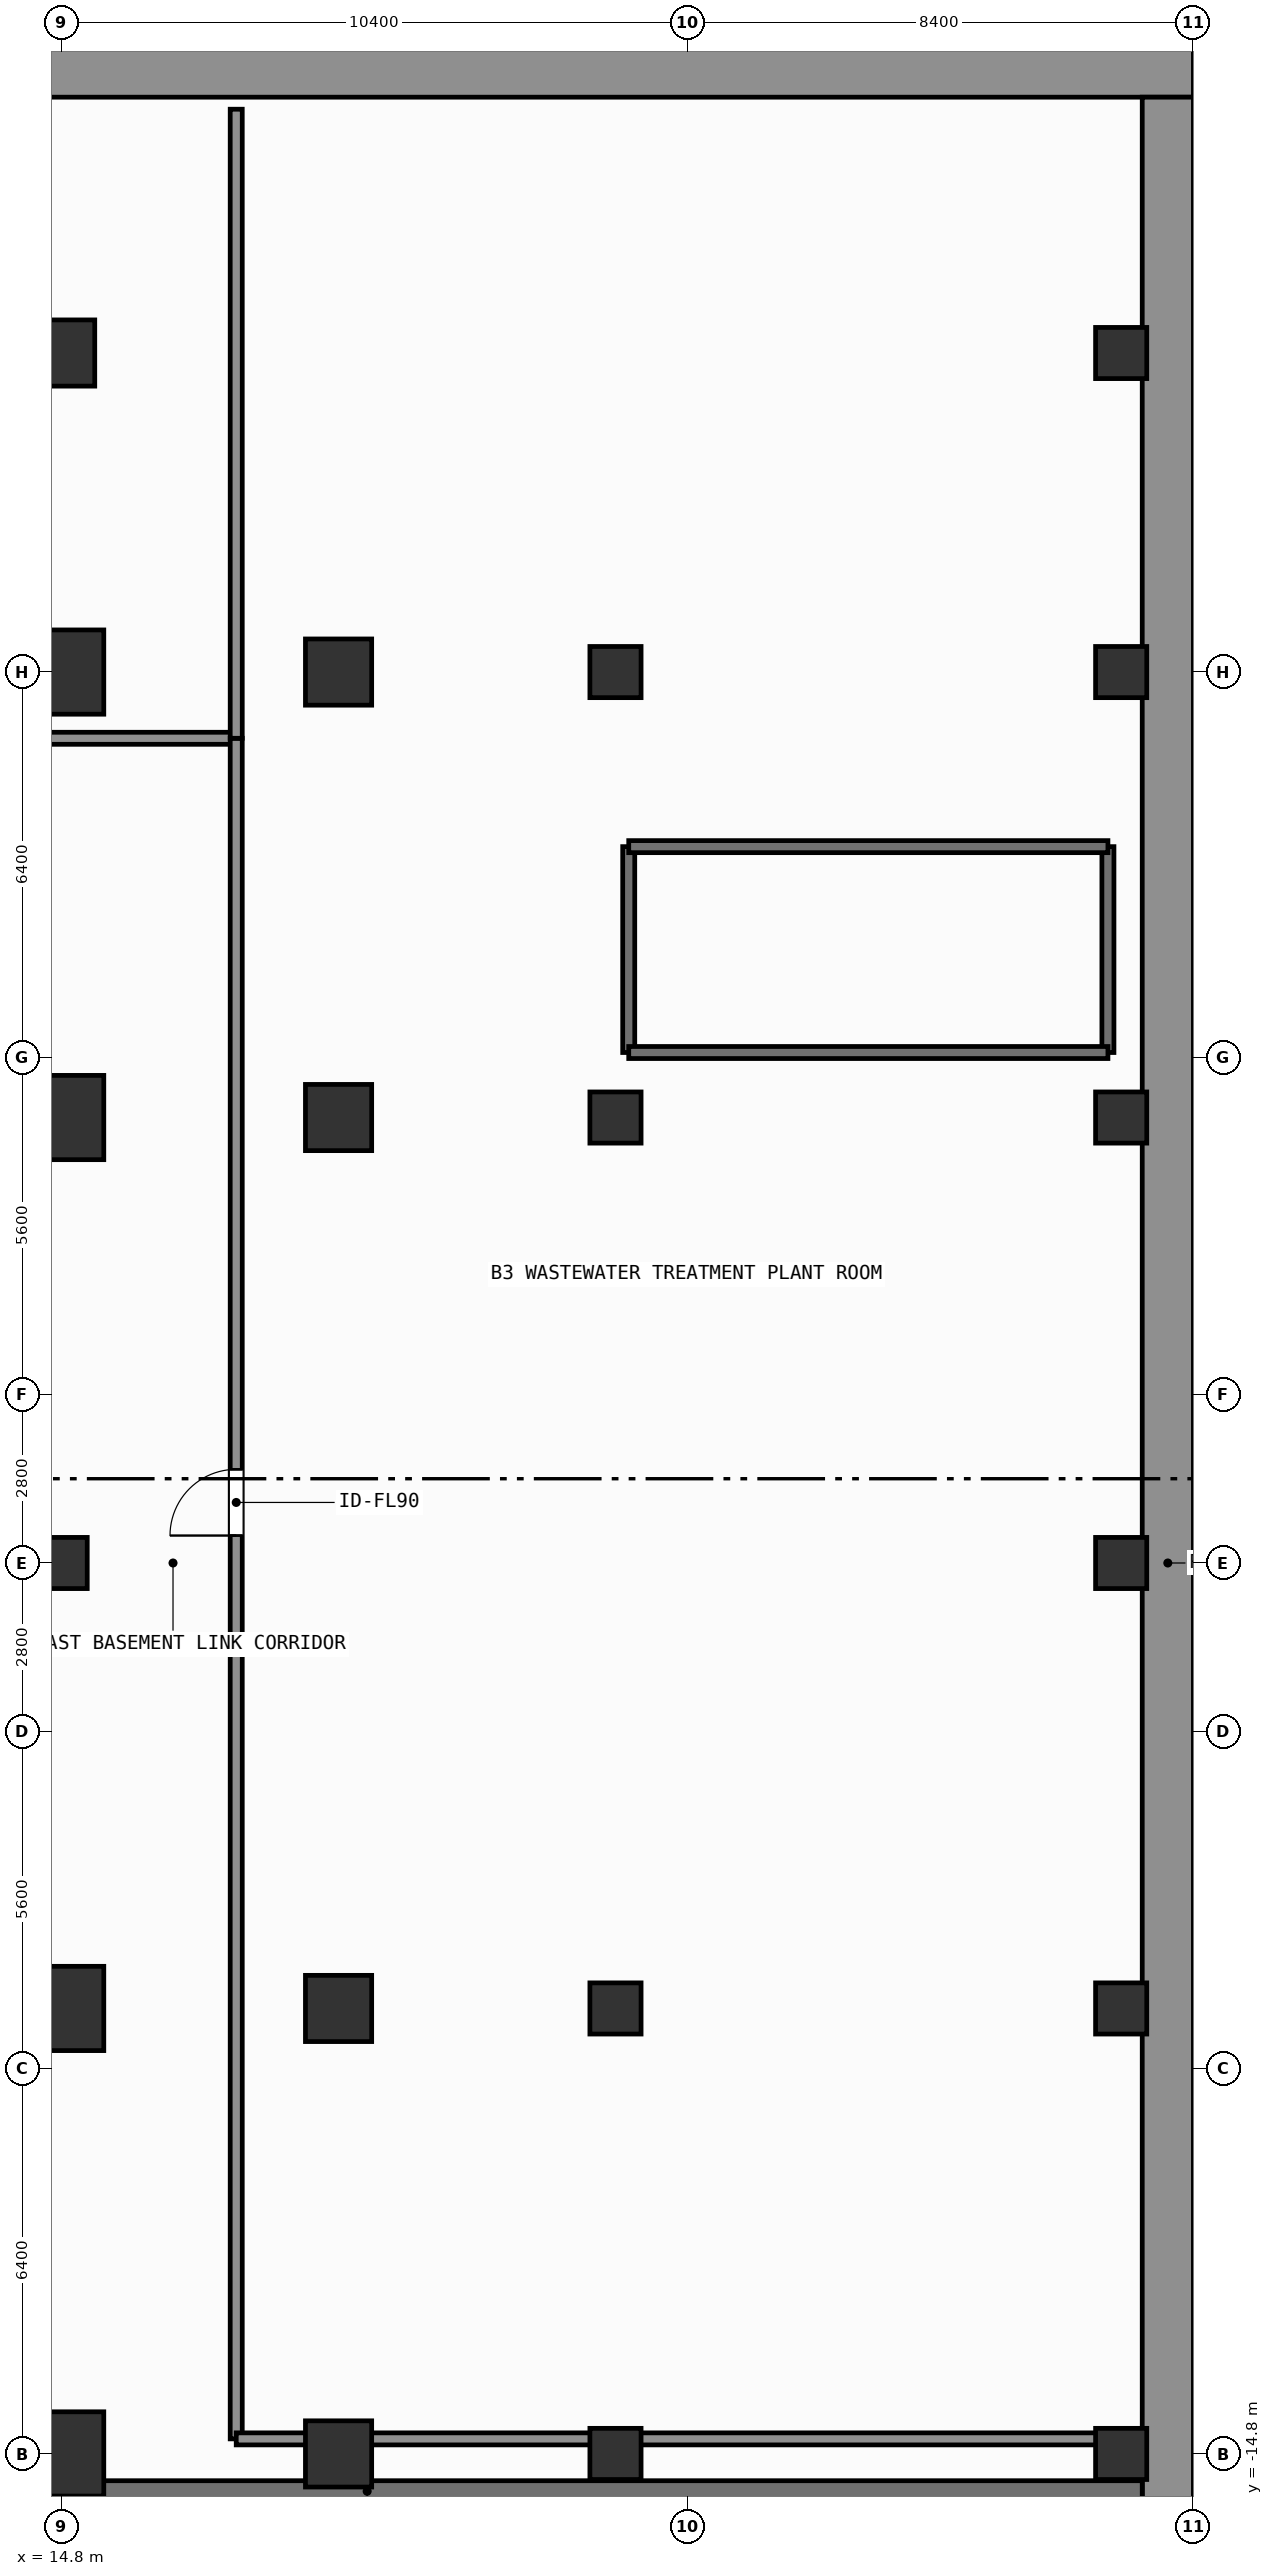
"""IFC4 building model, lengths in metres.
Left out: names, types, materials, properties, quantities, classifications, styles, units other than length and angle.
Written with IfcOpenShell. Run it as: python <this file> out.ifc"""

import sys

from ifc_helpers import new_model, si_unit, direction, frame, frame_2d, origin, origin_2d, place, context, subcontext, project, spatial, rectangle, extrude, element, fill, save


model = new_model("IFC4")
c1 = context("Model", 3, precision=1e-05, world=origin(), true_north=direction((0.0, 1.0)))
c2 = subcontext(c1, "Body", "Model", "MODEL_VIEW")
j1 = project(units=[si_unit("LENGTHUNIT", "METRE"), si_unit("PLANEANGLEUNIT", "RADIAN")], contexts=[c1])
p1 = place(None, origin())
s1 = spatial("IfcSite", under=j1, at=p1, CompositionType="ELEMENT")
p2 = place(p1, origin())
s2 = spatial("IfcBuilding", under=s1, at=p2, CompositionType="ELEMENT")
p3 = place(p2, frame((0.0, 0.0, -12.6)))
s3 = spatial("IfcBuildingStorey", under=s2, at=p3, CompositionType="ELEMENT", Elevation=-12.6)
p4 = place(p3, frame((-33.6, 24.775, 0.0), z_axis=(0.0, 0.0, 1.0), x_axis=(1.0, 0.0, 0.0)))
e1 = element("IfcWall", 1, at=p4, inside=s3, PredefinedType="SOLIDWALL", context=c2, shape_type="SweptSolid", body=[
    extrude(rectangle(XDim=67.2, YDim=0.85, at=frame_2d((33.6, 0.0))), origin(), (0.0, 0.0, 1.0), 4.2),
])
p5 = place(p3, frame((33.175, -24.35, 0.0), z_axis=(0.0, 0.0, 1.0), x_axis=(0.0, 1.0, 0.0)))
e2 = element("IfcWall", 2, at=p5, inside=s3, PredefinedType="SOLIDWALL", context=c2, shape_type="SweptSolid", body=[
    extrude(rectangle(XDim=48.7, YDim=0.85, at=frame_2d((24.35, 0.0))), origin(), (0.0, 0.0, 1.0), 4.2),
])
p6 = place(p3, frame((7.0, -15.42, 0.0), z_axis=(0.0, 0.0, 1.0), x_axis=(1.0, 0.0, 0.0)))
e3 = element("IfcWall", 3, at=p6, inside=s3, PredefinedType="SHEAR", context=c2, shape_type="SweptSolid", body=[
    extrude(rectangle(XDim=25.75, YDim=0.35, at=frame_2d((12.875, 0.0))), origin(), (0.0, 0.0, 1.0), 4.2),
])
for number, where, z_axis, x_axis in (
    (4, (14.8, -14.8, 0.0), (0.0, 0.0, 1.0), (1.0, 0.0, 0.0)),
    (5, (14.8, 14.8, 0.0), (0.0, 0.0, 1.0), (1.0, 0.0, 0.0)),
    (6, (14.8, -7.4, 0.0), (0.0, 0.0, 1.0), (1.0, 0.0, 0.0)),
    (7, (14.8, 7.4, 0.0), (0.0, 0.0, 1.0), (1.0, 0.0, 0.0)),
):
    element("IfcColumn", number, at=place(p3, frame(where, z_axis=z_axis, x_axis=x_axis)), inside=s3, PredefinedType="COLUMN", context=c2, shape_type="SweptSolid", body=[
        extrude(rectangle(XDim=1.4, YDim=1.4, at=origin_2d()), origin(), (0.0, 0.0, 1.0), 4.2),
    ])
for number, where, z_axis, x_axis in (
    (8, (19.4, -14.8, 0.0), (0.0, 0.0, 1.0), (1.0, 0.0, 0.0)),
    (9, (19.4, -7.4, 0.0), (0.0, 0.0, 1.0), (1.0, 0.0, 0.0)),
    (10, (19.4, 7.4, 0.0), (0.0, 0.0, 1.0), (1.0, 0.0, 0.0)),
    (11, (19.4, 14.8, 0.0), (0.0, 0.0, 1.0), (1.0, 0.0, 0.0)),
    (12, (14.8, 20.1, 0.0), (0.0, 0.0, 1.0), (1.0, 0.0, 0.0)),
):
    element("IfcColumn", number, at=place(p3, frame(where, z_axis=z_axis, x_axis=x_axis)), inside=s3, PredefinedType="COLUMN", context=c2, shape_type="SweptSolid", body=[
        extrude(rectangle(XDim=1.1, YDim=1.1, at=origin_2d()), origin(), (0.0, 0.0, 1.0), 4.2),
    ])
for number, where, z_axis, x_axis in (
    (13, (14.8, 0.0, 0.0), (0.0, 0.0, 1.0), (1.0, 0.0, 0.0)),
    (14, (24.0, -14.8, 0.0), (0.0, 0.0, 1.0), (1.0, 0.0, 0.0)),
    (15, (24.0, -7.4, 0.0), (0.0, 0.0, 1.0), (1.0, 0.0, 0.0)),
    (16, (24.0, 7.4, 0.0), (0.0, 0.0, 1.0), (1.0, 0.0, 0.0)),
    (17, (24.0, 14.8, 0.0), (0.0, 0.0, 1.0), (1.0, 0.0, 0.0)),
    (18, (32.4, -14.8, 0.0), (0.0, 0.0, 1.0), (1.0, 0.0, 0.0)),
    (19, (32.4, -7.4, 0.0), (0.0, 0.0, 1.0), (1.0, 0.0, 0.0)),
    (20, (32.4, 0.0, 0.0), (0.0, 0.0, 1.0), (1.0, 0.0, 0.0)),
    (21, (32.4, 7.4, 0.0), (0.0, 0.0, 1.0), (1.0, 0.0, 0.0)),
    (22, (32.4, 14.8, 0.0), (0.0, 0.0, 1.0), (1.0, 0.0, 0.0)),
    (23, (32.4, 20.1, 0.0), (0.0, 0.0, 1.0), (1.0, 0.0, 0.0)),
):
    element("IfcColumn", number, at=place(p3, frame(where, z_axis=z_axis, x_axis=x_axis)), inside=s3, PredefinedType="COLUMN", context=c2, shape_type="SweptSolid", body=[
        extrude(rectangle(XDim=0.85, YDim=0.85, at=origin_2d()), origin(), (0.0, 0.0, 1.0), 4.2),
    ])
for number, where, z_axis, x_axis in (
    (24, (24.22, 8.48, 0.0), (0.0, 0.0, 1.0), (0.0, 1.0, 0.0)),
    (25, (32.18, 11.9, 0.0), (0.0, 0.0, 1.0), (0.0, -1.0, 0.0)),
):
    element("IfcWall", number, at=place(p3, frame(where, z_axis=z_axis, x_axis=x_axis)), inside=s3, PredefinedType="SHEAR", context=c2, shape_type="SweptSolid", body=[
        extrude(rectangle(XDim=3.42, YDim=0.2, at=frame_2d((1.71, 0.0))), origin(), (0.0, 0.0, 1.0), 3.94),
    ])
for number, where, z_axis, x_axis in (
    (26, (32.18, 8.48, 0.0), (0.0, 0.0, 1.0), (-1.0, 0.0, 0.0)),
    (27, (24.22, 11.9, 0.0), (0.0, 0.0, 1.0), (1.0, 0.0, 0.0)),
):
    element("IfcWall", number, at=place(p3, frame(where, z_axis=z_axis, x_axis=x_axis)), inside=s3, PredefinedType="SHEAR", context=c2, shape_type="SweptSolid", body=[
        extrude(rectangle(XDim=7.96, YDim=0.2, at=frame_2d((3.98, 0.0))), origin(), (0.0, 0.0, 1.0), 3.94),
    ])
p7 = place(p3, frame((-13.6, 13.7, 0.0), z_axis=(0.0, 0.0, 1.0), x_axis=(1.0, 0.0, 0.0)))
e28 = element("IfcWall", 28, at=p7, inside=s3, PredefinedType="SOLIDWALL", context=c2, shape_type="SweptSolid", body=[
    extrude(rectangle(XDim=31.3, YDim=0.2, at=frame_2d((15.65, 0.0))), origin(), (0.0, 0.0, 1.0), 3.94),
])
p8 = place(p7, frame((14.38, 0.0, 0.0)))
e29 = element("IfcOpeningElement", 29, at=p8, cuts=e28, PredefinedType="OPENING", context=c2, shape_type="SweptSolid", body=[
    extrude(rectangle(XDim=1.1, YDim=2.15, at=frame_2d((0.55, 1.075))), frame((0.0, 0.11, 0.0), z_axis=(0.0, -1.0, 0.0), x_axis=(1.0, 0.0, 0.0)), (0.0, 0.0, 1.0), 0.22),
])
p9 = place(p3, frame((17.7, -14.55, 0.0), z_axis=(0.0, 0.0, 1.0), x_axis=(0.0, 1.0, 0.0)))
e30 = element("IfcWall", 30, at=p9, inside=s3, PredefinedType="SOLIDWALL", context=c2, shape_type="SweptSolid", body=[
    extrude(rectangle(XDim=28.25, YDim=0.2, at=frame_2d((14.125, 0.0))), origin(), (0.0, 0.0, 1.0), 3.94),
])
p10 = place(p9, frame((15.006, 0.0, 0.0)))
e31 = element("IfcOpeningElement", 31, at=p10, cuts=e30, PredefinedType="OPENING", context=c2, shape_type="SweptSolid", body=[
    extrude(rectangle(XDim=1.1, YDim=2.15, at=frame_2d((0.55, 1.075))), frame((0.0, 0.11, 0.0), z_axis=(0.0, -1.0, 0.0), x_axis=(1.0, 0.0, 0.0)), (0.0, 0.0, 1.0), 0.22),
])
p11 = place(p3, frame((17.7, 13.7, 0.0), z_axis=(0.0, 0.0, 1.0), x_axis=(0.0, 1.0, 0.0)))
e32 = element("IfcWall", 32, at=p11, inside=s3, PredefinedType="SOLIDWALL", context=c2, shape_type="SweptSolid", body=[
    extrude(rectangle(XDim=10.45, YDim=0.2, at=frame_2d((5.225, 0.0))), origin(), (0.0, 0.0, 1.0), 3.94),
])
p12 = place(p3, frame((17.7, -14.55, 0.0), z_axis=(0.0, 0.0, 1.0), x_axis=(1.0, 0.0, 0.0)))
e33 = element("IfcWall", 33, at=p12, inside=s3, PredefinedType="SOLIDWALL", context=c2, shape_type="SweptSolid", body=[
    extrude(rectangle(XDim=14.95, YDim=0.2, at=frame_2d((7.475, 0.0))), origin(), (0.0, 0.0, 1.0), 3.23),
])
p13 = place(p10, origin())
e34 = element("IfcDoor", 34, at=p13, inside=s3, OperationType="SINGLE_SWING_LEFT", PredefinedType="DOOR", context=c2, shape_type="SweptSolid", body=[
    extrude(rectangle(XDim=1.1, YDim=2.15, at=frame_2d((0.55, 1.075))), frame((0.0, 0.025, 0.0), z_axis=(0.0, -1.0, 0.0), x_axis=(1.0, 0.0, 0.0)), (0.0, 0.0, 1.0), 0.05),
])
fill(e31, e34)
save(model, sys.argv[1])
